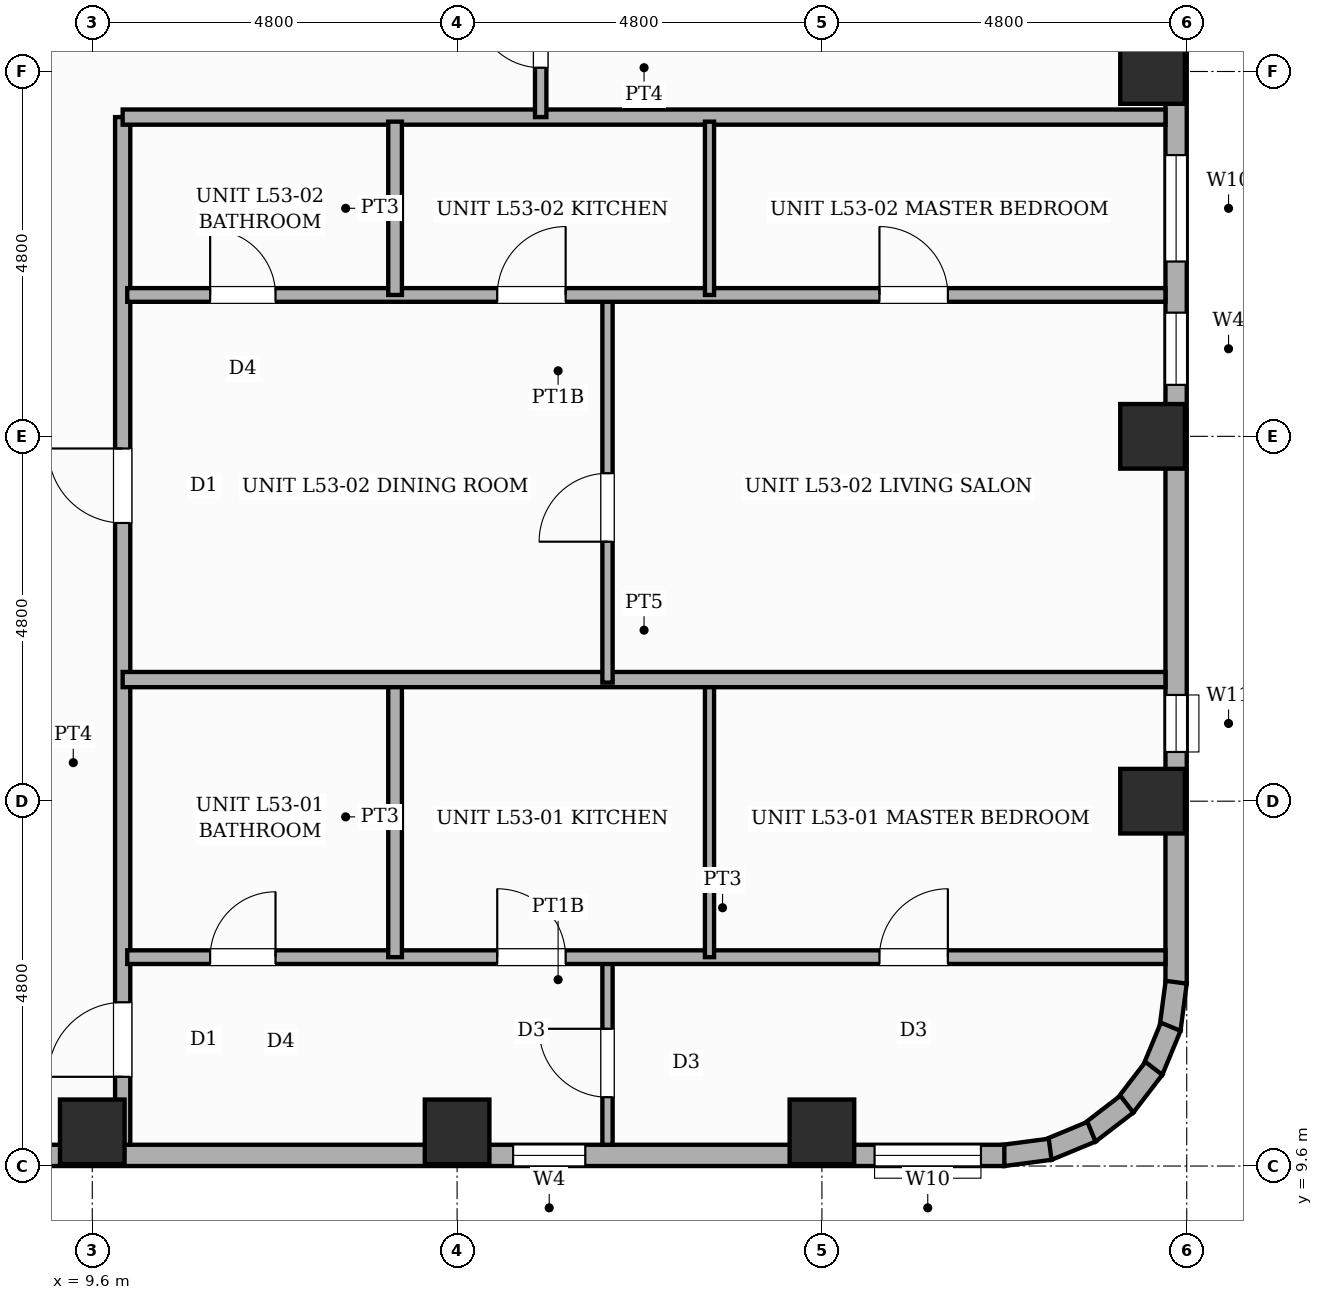
"""IFC4 building model, lengths in metres.
Left out: names, types, materials, properties, quantities, classifications, styles, units other than length and angle.
Written with IfcOpenShell. Run it as: python <this file> out.ifc"""

import sys

from ifc_helpers import new_model, si_unit, direction, frame, frame_2d, origin, origin_2d, place, context, subcontext, project, spatial, rectangle, extrude, element, fill, save


model = new_model("IFC4")
c1 = context("Model", 3, precision=1e-05, world=origin(), true_north=direction((0.0, 1.0)))
c2 = subcontext(c1, "Body", "Model", "MODEL_VIEW")
j1 = project(units=[si_unit("LENGTHUNIT", "METRE"), si_unit("PLANEANGLEUNIT", "RADIAN")], contexts=[c1])
p1 = place(None, origin())
s1 = spatial("IfcSite", under=j1, at=p1, CompositionType="ELEMENT")
p2 = place(p1, origin())
s2 = spatial("IfcBuilding", under=s1, at=p2, CompositionType="ELEMENT")
p3 = place(p2, frame((0.0, 0.0, 203.8)))
s3 = spatial("IfcBuildingStorey", under=s2, at=p3, CompositionType="ELEMENT", Elevation=203.8)
for number, where, z_axis, x_axis in (
    (1, (9.6, 10.05, 0.0), (0.0, 0.0, 1.0), (1.0, 0.0, 0.0)),
    (2, (14.4, 10.05, 0.0), (0.0, 0.0, 1.0), (1.0, 0.0, 0.0)),
    (3, (19.2, 10.05, 0.0), (0.0, 0.0, 1.0), (1.0, 0.0, 0.0)),
    (4, (23.55, 14.4, 0.0), (0.0, 0.0, 1.0), (1.0, 0.0, 0.0)),
    (5, (23.55, 19.2, 0.0), (0.0, 0.0, 1.0), (1.0, 0.0, 0.0)),
    (6, (23.55, 24.0, 0.0), (0.0, 0.0, 1.0), (1.0, 0.0, 0.0)),
):
    element("IfcColumn", number, at=place(p3, frame(where, z_axis=z_axis, x_axis=x_axis)), inside=s3, PredefinedType="COLUMN", context=c2, shape_type="SweptSolid", body=[
        extrude(rectangle(XDim=0.85, YDim=0.85, at=origin_2d()), origin(), (0.0, 0.0, 1.0), 3.6),
    ])
p4 = place(p3, frame((23.86, 26.4, 0.0), z_axis=(0.0, 0.0, 1.0), x_axis=(0.0, -1.0, 0.0)))
e7 = element("IfcWall", 7, at=p4, inside=s3, PredefinedType="STANDARD", context=c2, shape_type="SweptSolid", body=[
    extrude(rectangle(XDim=14.4, YDim=0.28, at=frame_2d((7.2, 0.0))), origin(), (0.0, 0.0, 1.0), 2.66),
])
p5 = place(p4, frame((10.603, 0.0, 0.45)))
e8 = element("IfcOpeningElement", 8, at=p5, cuts=e7, PredefinedType="OPENING", context=c2, shape_type="SweptSolid", body=[
    extrude(rectangle(XDim=0.75, YDim=1.8, at=frame_2d((0.375, 0.9))), frame((0.0, 0.15, 0.0), z_axis=(0.0, -1.0, 0.0), x_axis=(1.0, 0.0, 0.0)), (0.0, 0.0, 1.0), 0.3),
])
p6 = place(p4, frame((3.5, 0.0, 0.65)))
e9 = element("IfcOpeningElement", 9, at=p6, cuts=e7, PredefinedType="OPENING", context=c2, shape_type="SweptSolid", body=[
    extrude(rectangle(XDim=1.4, YDim=1.1, at=frame_2d((0.7, 0.55))), frame((0.0, 0.15, 0.0), z_axis=(0.0, -1.0, 0.0), x_axis=(1.0, 0.0, 0.0)), (0.0, 0.0, 1.0), 0.3),
])
p7 = place(p4, frame((5.573, 0.0, 0.45)))
e10 = element("IfcOpeningElement", 10, at=p7, cuts=e7, PredefinedType="OPENING", context=c2, shape_type="SweptSolid", body=[
    extrude(rectangle(XDim=0.95, YDim=1.8, at=frame_2d((0.475, 0.9))), frame((0.0, 0.15, 0.0), z_axis=(0.0, -1.0, 0.0), x_axis=(1.0, 0.0, 0.0)), (0.0, 0.0, 1.0), 0.3),
])
p8 = place(p4, frame((0.933, 0.0, 0.45)))
e11 = element("IfcOpeningElement", 11, at=p8, cuts=e7, PredefinedType="OPENING", context=c2, shape_type="SweptSolid", body=[
    extrude(rectangle(XDim=0.75, YDim=1.8, at=frame_2d((0.375, 0.9))), frame((0.0, 0.15, 0.0), z_axis=(0.0, -1.0, 0.0), x_axis=(1.0, 0.0, 0.0)), (0.0, 0.0, 1.0), 0.3),
])
for number, where, z_axis, x_axis in (
    (12, (23.861, 12.018, 0.0), (0.0, 0.0, 1.0), (-0.131, -0.991, 0.0)),
    (13, (23.789, 11.432, 0.0), (0.0, 0.0, 1.0), (-0.382, -0.924, 0.0)),
    (14, (23.567, 10.885, 0.0), (0.0, 0.0, 1.0), (-0.609, -0.793, 0.0)),
    (15, (23.212, 10.414, 0.0), (0.0, 0.0, 1.0), (-0.793, -0.609, 0.0)),
    (16, (22.746, 10.051, 0.0), (0.0, 0.0, 1.0), (-0.924, -0.383, 0.0)),
    (17, (22.203, 9.821, 0.0), (0.0, 0.0, 1.0), (-0.991, -0.131, 0.0)),
):
    element("IfcWall", number, at=place(p3, frame(where, z_axis=z_axis, x_axis=x_axis)), inside=s3, PredefinedType="STANDARD", context=c2, shape_type="SweptSolid", body=[
        extrude(rectangle(XDim=0.626, YDim=0.28, at=frame_2d((0.313, 0.0))), origin(), (0.0, 0.0, 1.0), 3.38),
    ])
p9 = place(p3, frame((21.6, 9.74, 0.0), z_axis=(0.0, 0.0, 1.0), x_axis=(-1.0, 0.0, 0.0)))
e18 = element("IfcWall", 18, at=p9, inside=s3, PredefinedType="STANDARD", context=c2, shape_type="SweptSolid", body=[
    extrude(rectangle(XDim=14.4, YDim=0.28, at=frame_2d((7.2, 0.0))), origin(), (0.0, 0.0, 1.0), 2.66),
])
p10 = place(p9, frame((12.647, 0.0, 0.45)))
e19 = element("IfcOpeningElement", 19, at=p10, cuts=e18, PredefinedType="OPENING", context=c2, shape_type="SweptSolid", body=[
    extrude(rectangle(XDim=0.6, YDim=1.8, at=frame_2d((0.3, 0.9))), frame((0.0, 0.15, 0.0), z_axis=(0.0, -1.0, 0.0), x_axis=(1.0, 0.0, 0.0)), (0.0, 0.0, 1.0), 0.3),
])
p11 = place(p9, frame((5.513, 0.0, 0.45)))
e20 = element("IfcOpeningElement", 20, at=p11, cuts=e18, PredefinedType="OPENING", context=c2, shape_type="SweptSolid", body=[
    extrude(rectangle(XDim=0.95, YDim=1.8, at=frame_2d((0.475, 0.9))), frame((0.0, 0.15, 0.0), z_axis=(0.0, -1.0, 0.0), x_axis=(1.0, 0.0, 0.0)), (0.0, 0.0, 1.0), 0.3),
])
p12 = place(p9, frame((0.308, 0.0, 0.65)))
e21 = element("IfcOpeningElement", 21, at=p12, cuts=e18, PredefinedType="OPENING", context=c2, shape_type="SweptSolid", body=[
    extrude(rectangle(XDim=1.4, YDim=1.1, at=frame_2d((0.7, 0.55))), frame((0.0, 0.15, 0.0), z_axis=(0.0, -1.0, 0.0), x_axis=(1.0, 0.0, 0.0)), (0.0, 0.0, 1.0), 0.3),
])
p13 = place(p3, frame((10.0, 9.88, 0.0), z_axis=(0.0, 0.0, 1.0), x_axis=(0.0, 1.0, 0.0)))
e22 = element("IfcWall", 22, at=p13, inside=s3, PredefinedType="PARTITIONING", context=c2, shape_type="SweptSolid", body=[
    extrude(rectangle(XDim=13.52, YDim=0.2, at=frame_2d((6.76, 0.0))), origin(), (0.0, 0.0, 1.0), 3.38),
])
p14 = place(p13, frame((0.894, 0.0, 0.0)))
e23 = element("IfcOpeningElement", 23, at=p14, cuts=e22, PredefinedType="OPENING", context=c2, shape_type="SweptSolid", body=[
    extrude(rectangle(XDim=0.98, YDim=2.18, at=frame_2d((0.49, 1.09))), frame((0.0, 0.11, 0.0), z_axis=(0.0, -1.0, 0.0), x_axis=(1.0, 0.0, 0.0)), (0.0, 0.0, 1.0), 0.22),
])
p15 = place(p13, frame((8.18, 0.0, 0.0)))
e24 = element("IfcOpeningElement", 24, at=p15, cuts=e22, PredefinedType="OPENING", context=c2, shape_type="SweptSolid", body=[
    extrude(rectangle(XDim=0.98, YDim=2.18, at=frame_2d((0.49, 1.09))), frame((0.0, 0.11, 0.0), z_axis=(0.0, -1.0, 0.0), x_axis=(1.0, 0.0, 0.0)), (0.0, 0.0, 1.0), 0.22),
])
p16 = place(p3, frame((10.0, 23.4, 0.0), z_axis=(0.0, 0.0, 1.0), x_axis=(1.0, 0.0, 0.0)))
e25 = element("IfcWall", 25, at=p16, inside=s3, PredefinedType="PARTITIONING", context=c2, shape_type="SweptSolid", body=[
    extrude(rectangle(XDim=13.72, YDim=0.2, at=frame_2d((6.86, 0.0))), origin(), (0.0, 0.0, 1.0), 3.38),
])
p17 = place(p3, frame((15.5, 23.4, 0.0), z_axis=(0.0, 0.0, 1.0), x_axis=(0.0, 1.0, 0.0)))
e26 = element("IfcWall", 26, at=p17, inside=s3, PredefinedType="PARTITIONING", context=c2, shape_type="SweptSolid", body=[
    extrude(rectangle(XDim=2.35, YDim=0.15, at=frame_2d((1.175, 0.0))), origin(), (0.0, 0.0, 1.0), 3.38),
])
p18 = place(p17, frame((0.65, 0.0, 0.0)))
e27 = element("IfcOpeningElement", 27, at=p18, cuts=e26, PredefinedType="OPENING", context=c2, shape_type="SweptSolid", body=[
    extrude(rectangle(XDim=0.86, YDim=2.1, at=frame_2d((0.43, 1.05))), frame((0.0, 0.085, 0.0), z_axis=(0.0, -1.0, 0.0), x_axis=(1.0, 0.0, 0.0)), (0.0, 0.0, 1.0), 0.17),
])
p19 = place(p3, frame((16.379, 9.88, 0.0), z_axis=(0.0, 0.0, 1.0), x_axis=(0.0, 1.0, 0.0)))
e28 = element("IfcWall", 28, at=p19, inside=s3, PredefinedType="PARTITIONING", context=c2, shape_type="SweptSolid", body=[
    extrude(rectangle(XDim=2.468, YDim=0.135, at=frame_2d((1.234, 0.0))), origin(), (0.0, 0.0, 1.0), 3.38),
])
p20 = place(p19, frame((0.625, 0.0, 0.0)))
e29 = element("IfcOpeningElement", 29, at=p20, cuts=e28, PredefinedType="OPENING", context=c2, shape_type="SweptSolid", body=[
    extrude(rectangle(XDim=0.9, YDim=2.15, at=frame_2d((0.45, 1.075))), frame((0.0, 0.078, 0.0), z_axis=(0.0, -1.0, 0.0), x_axis=(1.0, 0.0, 0.0)), (0.0, 0.0, 1.0), 0.155),
])
p21 = place(p3, frame((10.06, 12.348, 0.0), z_axis=(0.0, 0.0, 1.0), x_axis=(1.0, 0.0, 0.0)))
e30 = element("IfcWall", 30, at=p21, inside=s3, PredefinedType="PLUMBINGWALL", context=c2, shape_type="SweptSolid", body=[
    extrude(rectangle(XDim=13.66, YDim=0.18, at=frame_2d((6.83, 0.0))), origin(), (0.0, 0.0, 1.0), 3.38),
])
p22 = place(p21, frame((1.091, 0.0, 0.0)))
e31 = element("IfcOpeningElement", 31, at=p22, cuts=e30, PredefinedType="OPENING", context=c2, shape_type="SweptSolid", body=[
    extrude(rectangle(XDim=0.86, YDim=2.1, at=frame_2d((0.43, 1.05))), frame((0.0, 0.1, 0.0), z_axis=(0.0, -1.0, 0.0), x_axis=(1.0, 0.0, 0.0)), (0.0, 0.0, 1.0), 0.2),
])
p23 = place(p21, frame((4.868, 0.0, 0.0)))
e32 = element("IfcOpeningElement", 32, at=p23, cuts=e30, PredefinedType="OPENING", context=c2, shape_type="SweptSolid", body=[
    extrude(rectangle(XDim=0.9, YDim=2.15, at=frame_2d((0.45, 1.075))), frame((0.0, 0.1, 0.0), z_axis=(0.0, -1.0, 0.0), x_axis=(1.0, 0.0, 0.0)), (0.0, 0.0, 1.0), 0.2),
])
p24 = place(p21, frame((9.897, 0.0, 0.0)))
e33 = element("IfcOpeningElement", 33, at=p24, cuts=e30, PredefinedType="OPENING", context=c2, shape_type="SweptSolid", body=[
    extrude(rectangle(XDim=0.9, YDim=2.15, at=frame_2d((0.45, 1.075))), frame((0.0, 0.1, 0.0), z_axis=(0.0, -1.0, 0.0), x_axis=(1.0, 0.0, 0.0)), (0.0, 0.0, 1.0), 0.2),
])
p25 = place(p3, frame((13.584, 12.348, 0.0), z_axis=(0.0, 0.0, 1.0), x_axis=(0.0, 1.0, 0.0)))
e34 = element("IfcWall", 34, at=p25, inside=s3, PredefinedType="PLUMBINGWALL", context=c2, shape_type="SweptSolid", body=[
    extrude(rectangle(XDim=3.692, YDim=0.18, at=frame_2d((1.846, 0.0))), origin(), (0.0, 0.0, 1.0), 3.38),
])
p26 = place(p3, frame((17.721, 12.348, 0.0), z_axis=(0.0, 0.0, 1.0), x_axis=(0.0, 1.0, 0.0)))
e35 = element("IfcWall", 35, at=p26, inside=s3, PredefinedType="PARTITIONING", context=c2, shape_type="SweptSolid", body=[
    extrude(rectangle(XDim=3.692, YDim=0.12, at=frame_2d((1.846, 0.0))), origin(), (0.0, 0.0, 1.0), 3.38),
])
p27 = place(p3, frame((10.0, 16.0, 0.0), z_axis=(0.0, 0.0, 1.0), x_axis=(1.0, 0.0, 0.0)))
e36 = element("IfcWall", 36, at=p27, inside=s3, PredefinedType="SOLIDWALL", context=c2, shape_type="SweptSolid", body=[
    extrude(rectangle(XDim=13.72, YDim=0.2, at=frame_2d((6.86, 0.0))), origin(), (0.0, 0.0, 1.0), 3.38),
])
p28 = place(p3, frame((16.379, 15.96, 0.0), z_axis=(0.0, 0.0, 1.0), x_axis=(0.0, 1.0, 0.0)))
e37 = element("IfcWall", 37, at=p28, inside=s3, PredefinedType="PARTITIONING", context=c2, shape_type="SweptSolid", body=[
    extrude(rectangle(XDim=5.1, YDim=0.135, at=frame_2d((2.55, 0.0))), origin(), (0.0, 0.0, 1.0), 3.38),
])
p29 = place(p28, frame((1.854, 0.0, 0.0)))
e38 = element("IfcOpeningElement", 38, at=p29, cuts=e37, PredefinedType="OPENING", context=c2, shape_type="SweptSolid", body=[
    extrude(rectangle(XDim=0.9, YDim=2.15, at=frame_2d((0.45, 1.075))), frame((0.0, 0.078, 0.0), z_axis=(0.0, -1.0, 0.0), x_axis=(1.0, 0.0, 0.0)), (0.0, 0.0, 1.0), 0.155),
])
p30 = place(p3, frame((10.06, 21.06, 0.0), z_axis=(0.0, 0.0, 1.0), x_axis=(1.0, 0.0, 0.0)))
e39 = element("IfcWall", 39, at=p30, inside=s3, PredefinedType="PLUMBINGWALL", context=c2, shape_type="SweptSolid", body=[
    extrude(rectangle(XDim=13.66, YDim=0.18, at=frame_2d((6.83, 0.0))), origin(), (0.0, 0.0, 1.0), 3.38),
])
p31 = place(p30, frame((1.091, 0.0, 0.0)))
e40 = element("IfcOpeningElement", 40, at=p31, cuts=e39, PredefinedType="OPENING", context=c2, shape_type="SweptSolid", body=[
    extrude(rectangle(XDim=0.86, YDim=2.1, at=frame_2d((0.43, 1.05))), frame((0.0, 0.1, 0.0), z_axis=(0.0, -1.0, 0.0), x_axis=(1.0, 0.0, 0.0)), (0.0, 0.0, 1.0), 0.2),
])
p32 = place(p30, frame((4.868, 0.0, 0.0)))
e41 = element("IfcOpeningElement", 41, at=p32, cuts=e39, PredefinedType="OPENING", context=c2, shape_type="SweptSolid", body=[
    extrude(rectangle(XDim=0.9, YDim=2.15, at=frame_2d((0.45, 1.075))), frame((0.0, 0.1, 0.0), z_axis=(0.0, -1.0, 0.0), x_axis=(1.0, 0.0, 0.0)), (0.0, 0.0, 1.0), 0.2),
])
p33 = place(p30, frame((9.897, 0.0, 0.0)))
e42 = element("IfcOpeningElement", 42, at=p33, cuts=e39, PredefinedType="OPENING", context=c2, shape_type="SweptSolid", body=[
    extrude(rectangle(XDim=0.9, YDim=2.15, at=frame_2d((0.45, 1.075))), frame((0.0, 0.1, 0.0), z_axis=(0.0, -1.0, 0.0), x_axis=(1.0, 0.0, 0.0)), (0.0, 0.0, 1.0), 0.2),
])
p34 = place(p3, frame((13.584, 21.06, 0.0), z_axis=(0.0, 0.0, 1.0), x_axis=(0.0, 1.0, 0.0)))
e43 = element("IfcWall", 43, at=p34, inside=s3, PredefinedType="PLUMBINGWALL", context=c2, shape_type="SweptSolid", body=[
    extrude(rectangle(XDim=2.28, YDim=0.18, at=frame_2d((1.14, 0.0))), origin(), (0.0, 0.0, 1.0), 3.38),
])
p35 = place(p3, frame((17.721, 21.06, 0.0), z_axis=(0.0, 0.0, 1.0), x_axis=(0.0, 1.0, 0.0)))
e44 = element("IfcWall", 44, at=p35, inside=s3, PredefinedType="PARTITIONING", context=c2, shape_type="SweptSolid", body=[
    extrude(rectangle(XDim=2.28, YDim=0.12, at=frame_2d((1.14, 0.0))), origin(), (0.0, 0.0, 1.0), 3.38),
])
p36 = place(p5, origin())
e45 = element("IfcWindow", 45, at=p36, inside=s3, PartitioningType="SINGLE_PANEL", PredefinedType="WINDOW", context=c2, shape_type="SweptSolid", body=[
    extrude(rectangle(XDim=0.75, YDim=1.8, at=frame_2d((0.375, 0.9))), frame((0.0, 0.03, 0.0), z_axis=(0.0, -1.0, 0.0), x_axis=(1.0, 0.0, 0.0)), (0.0, 0.0, 1.0), 0.06),
])
fill(e8, e45)
p37 = place(p6, origin())
e46 = element("IfcWindow", 46, at=p37, inside=s3, PartitioningType="SINGLE_PANEL", PredefinedType="WINDOW", context=c2, shape_type="SweptSolid", body=[
    extrude(rectangle(XDim=1.4, YDim=1.1, at=frame_2d((0.7, 0.55))), frame((0.0, 0.03, 0.0), z_axis=(0.0, -1.0, 0.0), x_axis=(1.0, 0.0, 0.0)), (0.0, 0.0, 1.0), 0.06),
])
fill(e9, e46)
p38 = place(p7, origin())
e47 = element("IfcWindow", 47, at=p38, inside=s3, PartitioningType="SINGLE_PANEL", PredefinedType="WINDOW", context=c2, shape_type="SweptSolid", body=[
    extrude(rectangle(XDim=0.95, YDim=1.8, at=frame_2d((0.475, 0.9))), frame((0.0, 0.03, 0.0), z_axis=(0.0, -1.0, 0.0), x_axis=(1.0, 0.0, 0.0)), (0.0, 0.0, 1.0), 0.06),
])
fill(e10, e47)
p39 = place(p11, origin())
e48 = element("IfcWindow", 48, at=p39, inside=s3, PartitioningType="SINGLE_PANEL", PredefinedType="WINDOW", context=c2, shape_type="SweptSolid", body=[
    extrude(rectangle(XDim=0.95, YDim=1.8, at=frame_2d((0.475, 0.9))), frame((0.0, 0.03, 0.0), z_axis=(0.0, -1.0, 0.0), x_axis=(1.0, 0.0, 0.0)), (0.0, 0.0, 1.0), 0.06),
])
fill(e20, e48)
p40 = place(p12, origin())
e49 = element("IfcWindow", 49, at=p40, inside=s3, PartitioningType="SINGLE_PANEL", PredefinedType="WINDOW", context=c2, shape_type="SweptSolid", body=[
    extrude(rectangle(XDim=1.4, YDim=1.1, at=frame_2d((0.7, 0.55))), frame((0.0, 0.03, 0.0), z_axis=(0.0, -1.0, 0.0), x_axis=(1.0, 0.0, 0.0)), (0.0, 0.0, 1.0), 0.06),
])
fill(e21, e49)
p41 = place(p18, origin())
e50 = element("IfcDoor", 50, at=p41, inside=s3, OperationType="SINGLE_SWING_RIGHT", PredefinedType="DOOR", context=c2, shape_type="SweptSolid", body=[
    extrude(rectangle(XDim=0.86, YDim=2.1, at=frame_2d((0.43, 1.05))), frame((0.0, 0.025, 0.0), z_axis=(0.0, -1.0, 0.0), x_axis=(1.0, 0.0, 0.0)), (0.0, 0.0, 1.0), 0.05),
])
fill(e27, e50)
p42 = place(p14, origin())
e51 = element("IfcDoor", 51, at=p42, inside=s3, OperationType="SINGLE_SWING_LEFT", PredefinedType="DOOR", context=c2, shape_type="SweptSolid", body=[
    extrude(rectangle(XDim=0.98, YDim=2.18, at=frame_2d((0.49, 1.09))), frame((0.0, 0.025, 0.0), z_axis=(0.0, -1.0, 0.0), x_axis=(1.0, 0.0, 0.0)), (0.0, 0.0, 1.0), 0.05),
])
fill(e23, e51)
p43 = place(p20, origin())
e52 = element("IfcDoor", 52, at=p43, inside=s3, OperationType="SINGLE_SWING_RIGHT", PredefinedType="DOOR", context=c2, shape_type="SweptSolid", body=[
    extrude(rectangle(XDim=0.9, YDim=2.15, at=frame_2d((0.45, 1.075))), frame((0.0, 0.025, 0.0), z_axis=(0.0, -1.0, 0.0), x_axis=(1.0, 0.0, 0.0)), (0.0, 0.0, 1.0), 0.05),
])
fill(e29, e52)
p44 = place(p22, origin())
e53 = element("IfcDoor", 53, at=p44, inside=s3, OperationType="SINGLE_SWING_RIGHT", PredefinedType="DOOR", context=c2, shape_type="SweptSolid", body=[
    extrude(rectangle(XDim=0.86, YDim=2.1, at=frame_2d((0.43, 1.05))), frame((0.0, 0.025, 0.0), z_axis=(0.0, -1.0, 0.0), x_axis=(1.0, 0.0, 0.0)), (0.0, 0.0, 1.0), 0.05),
])
fill(e31, e53)
p45 = place(p23, origin())
e54 = element("IfcDoor", 54, at=p45, inside=s3, OperationType="SINGLE_SWING_LEFT", PredefinedType="DOOR", context=c2, shape_type="SweptSolid", body=[
    extrude(rectangle(XDim=0.9, YDim=2.15, at=frame_2d((0.45, 1.075))), frame((0.0, 0.025, 0.0), z_axis=(0.0, -1.0, 0.0), x_axis=(1.0, 0.0, 0.0)), (0.0, 0.0, 1.0), 0.05),
])
fill(e32, e54)
p46 = place(p24, origin())
e55 = element("IfcDoor", 55, at=p46, inside=s3, OperationType="SINGLE_SWING_RIGHT", PredefinedType="DOOR", context=c2, shape_type="SweptSolid", body=[
    extrude(rectangle(XDim=0.9, YDim=2.15, at=frame_2d((0.45, 1.075))), frame((0.0, 0.025, 0.0), z_axis=(0.0, -1.0, 0.0), x_axis=(1.0, 0.0, 0.0)), (0.0, 0.0, 1.0), 0.05),
])
fill(e33, e55)
p47 = place(p15, origin())
e56 = element("IfcDoor", 56, at=p47, inside=s3, OperationType="SINGLE_SWING_RIGHT", PredefinedType="DOOR", context=c2, shape_type="SweptSolid", body=[
    extrude(rectangle(XDim=0.98, YDim=2.18, at=frame_2d((0.49, 1.09))), frame((0.0, 0.025, 0.0), z_axis=(0.0, -1.0, 0.0), x_axis=(1.0, 0.0, 0.0)), (0.0, 0.0, 1.0), 0.05),
])
fill(e24, e56)
p48 = place(p29, origin())
e57 = element("IfcDoor", 57, at=p48, inside=s3, OperationType="SINGLE_SWING_LEFT", PredefinedType="DOOR", context=c2, shape_type="SweptSolid", body=[
    extrude(rectangle(XDim=0.9, YDim=2.15, at=frame_2d((0.45, 1.075))), frame((0.0, 0.025, 0.0), z_axis=(0.0, -1.0, 0.0), x_axis=(1.0, 0.0, 0.0)), (0.0, 0.0, 1.0), 0.05),
])
fill(e38, e57)
p49 = place(p31, origin())
e58 = element("IfcDoor", 58, at=p49, inside=s3, OperationType="SINGLE_SWING_LEFT", PredefinedType="DOOR", context=c2, shape_type="SweptSolid", body=[
    extrude(rectangle(XDim=0.86, YDim=2.1, at=frame_2d((0.43, 1.05))), frame((0.0, 0.025, 0.0), z_axis=(0.0, -1.0, 0.0), x_axis=(1.0, 0.0, 0.0)), (0.0, 0.0, 1.0), 0.05),
])
fill(e40, e58)
p50 = place(p32, origin())
e59 = element("IfcDoor", 59, at=p50, inside=s3, OperationType="SINGLE_SWING_RIGHT", PredefinedType="DOOR", context=c2, shape_type="SweptSolid", body=[
    extrude(rectangle(XDim=0.9, YDim=2.15, at=frame_2d((0.45, 1.075))), frame((0.0, 0.025, 0.0), z_axis=(0.0, -1.0, 0.0), x_axis=(1.0, 0.0, 0.0)), (0.0, 0.0, 1.0), 0.05),
])
fill(e41, e59)
p51 = place(p33, origin())
e60 = element("IfcDoor", 60, at=p51, inside=s3, OperationType="SINGLE_SWING_LEFT", PredefinedType="DOOR", context=c2, shape_type="SweptSolid", body=[
    extrude(rectangle(XDim=0.9, YDim=2.15, at=frame_2d((0.45, 1.075))), frame((0.0, 0.025, 0.0), z_axis=(0.0, -1.0, 0.0), x_axis=(1.0, 0.0, 0.0)), (0.0, 0.0, 1.0), 0.05),
])
fill(e42, e60)
save(model, sys.argv[1])
